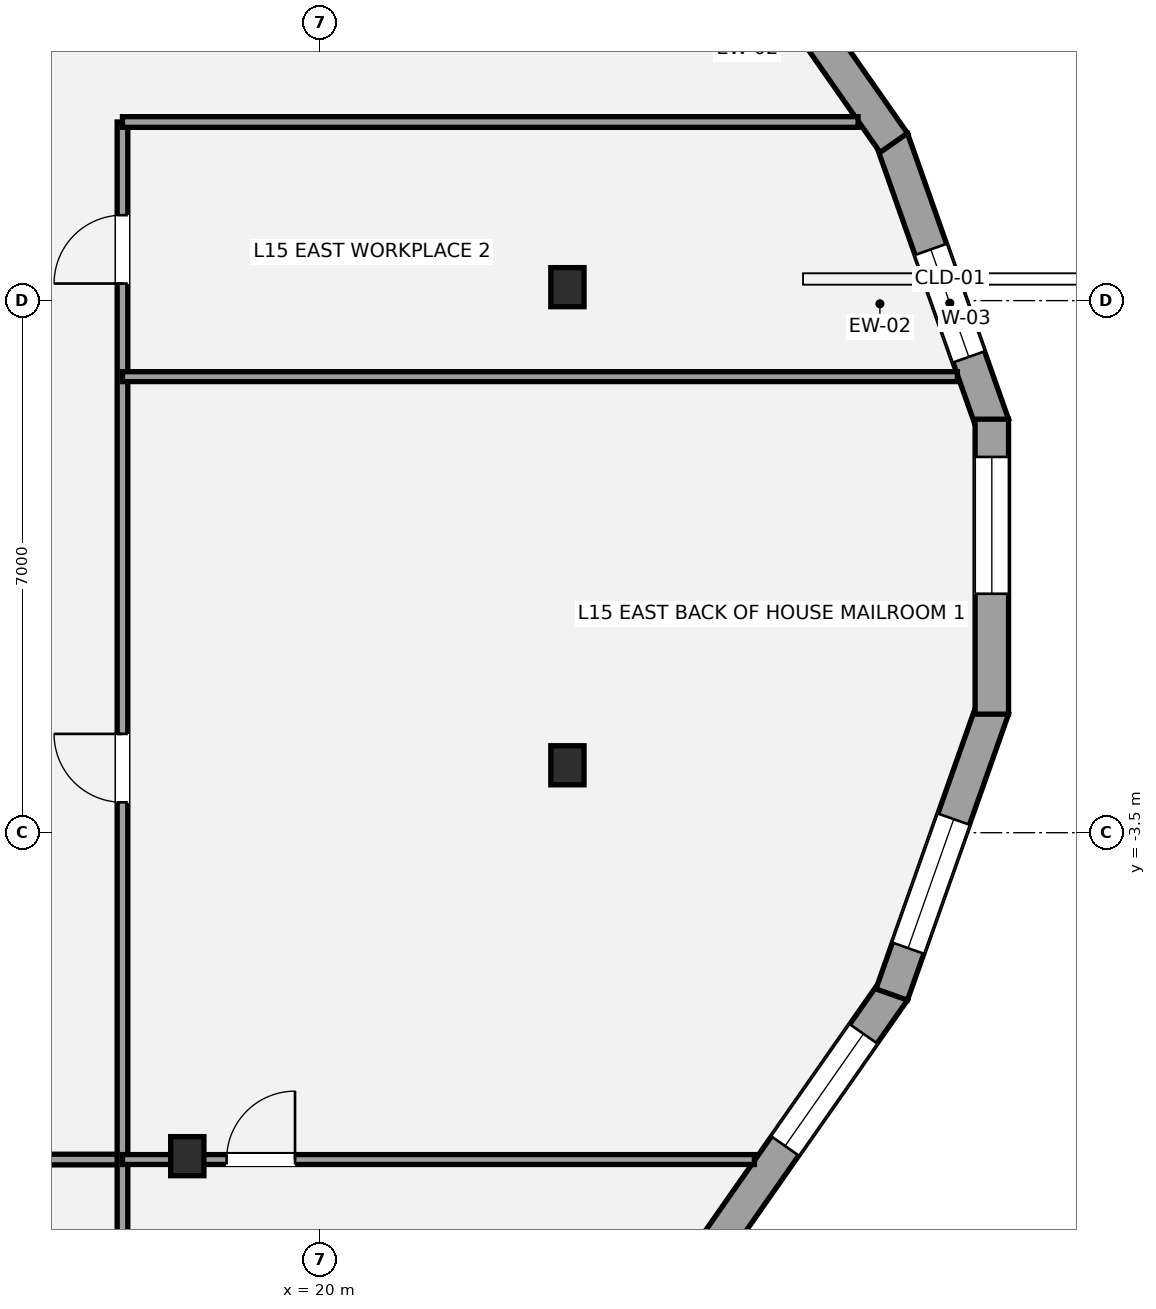
"""IFC4 building model, lengths in metres.
Left out: names, types, materials, properties, quantities, classifications, styles, units other than length and angle.
Written with IfcOpenShell. Run it as: python <this file> out.ifc"""

import sys

from ifc_helpers import new_model, si_unit, direction, frame, frame_2d, origin, origin_2d, place, context, subcontext, project, spatial, rectangle, i_section, extrude, element, fill, save


model = new_model("IFC4")
c1 = context("Model", 3, precision=1e-05, world=origin(), true_north=direction((0.0, 1.0)))
c2 = subcontext(c1, "Body", "Model", "MODEL_VIEW")
j1 = project(units=[si_unit("LENGTHUNIT", "METRE"), si_unit("PLANEANGLEUNIT", "RADIAN")], contexts=[c1])
p1 = place(None, origin())
s1 = spatial("IfcSite", under=j1, at=p1, CompositionType="ELEMENT")
p2 = place(p1, origin())
s2 = spatial("IfcBuilding", under=s1, at=p2, CompositionType="ELEMENT")
p3 = place(p2, frame((0.0, 0.0, 59.4)))
s3 = spatial("IfcBuildingStorey", under=s2, at=p3, CompositionType="ELEMENT", Elevation=59.4)
for number, where, z_axis, x_axis in (
    (1, (23.254, 3.677, 0.0), (0.0, 0.0, 1.0), (1.0, 0.0, 0.0)),
    (2, (18.253, -7.756, 0.0), (0.0, 0.0, 1.0), (1.0, 0.0, 0.0)),
    (3, (23.254, -2.613, 0.0), (0.0, 0.0, 1.0), (1.0, 0.0, 0.0)),
):
    element("IfcColumn", number, at=place(p3, frame(where, z_axis=z_axis, x_axis=x_axis)), inside=s3, PredefinedType="COLUMN", context=c2, shape_type="SweptSolid", body=[
        extrude(i_section(OverallWidth=0.437, OverallDepth=0.514, WebThickness=0.061, FlangeThickness=0.097, at=origin_2d()), origin(), (0.0, 0.0, 1.0), 3.6),
    ])
p4 = place(p3, frame((27.521, 5.629, 0.0), z_axis=(0.0, 0.0, 1.0), x_axis=(0.333264929682, -0.942833223133, 0.0)))
e4 = element("IfcWall", 4, at=p4, inside=s3, PredefinedType="STANDARD", context=c2, shape_type="SweptSolid", body=[
    extrude(rectangle(XDim=3.99, YDim=0.44, at=frame_2d((1.995, 0.0))), origin(), (0.0, 0.0, 1.0), 2.533),
])
p5 = place(p4, frame((1.544, 0.0, 0.48)))
e5 = element("IfcOpeningElement", 5, at=p5, cuts=e4, PredefinedType="OPENING", context=c2, shape_type="SweptSolid", body=[
    extrude(rectangle(XDim=1.5, YDim=1.7, at=frame_2d((0.75, 0.85))), frame((0.0, 0.23, 0.0), z_axis=(0.0, -1.0, 0.0), x_axis=(1.0, 0.0, 0.0)), (0.0, 0.0, 1.0), 0.46),
])
p6 = place(p3, frame((25.123, 9.043, 0.0), z_axis=(0.0, 0.0, 1.0), x_axis=(0.573152463572, -0.819448749771, 0.0)))
e6 = element("IfcWall", 6, at=p6, inside=s3, PredefinedType="STANDARD", context=c2, shape_type="SweptSolid", body=[
    extrude(rectangle(XDim=4.231, YDim=0.44, at=frame_2d((2.115, 0.0))), origin(), (0.0, 0.0, 1.0), 2.529),
])
p7 = place(p6, frame((0.2, 0.0, 0.58)))
e7 = element("IfcOpeningElement", 7, at=p7, cuts=e6, PredefinedType="OPENING", context=c2, shape_type="SweptSolid", body=[
    extrude(rectangle(XDim=1.4, YDim=1.55, at=frame_2d((0.7, 0.775))), frame((0.0, 0.23, 0.0), z_axis=(0.0, -1.0, 0.0), x_axis=(1.0, 0.0, 0.0)), (0.0, 0.0, 1.0), 0.46),
])
p8 = place(p3, frame((27.548, -5.576, 0.0), z_axis=(0.0, 0.0, 1.0), x_axis=(-0.573152463572, -0.819448749771, 0.0)))
e8 = element("IfcWall", 8, at=p8, inside=s3, PredefinedType="STANDARD", context=c2, shape_type="SweptSolid", body=[
    extrude(rectangle(XDim=4.231, YDim=0.44, at=frame_2d((2.115, 0.0))), origin(), (0.0, 0.0, 1.0), 2.529),
])
p9 = place(p8, frame((0.695, 0.0, 0.65)))
e9 = element("IfcOpeningElement", 9, at=p9, cuts=e8, PredefinedType="OPENING", context=c2, shape_type="SweptSolid", body=[
    extrude(rectangle(XDim=1.8, YDim=1.7, at=frame_2d((0.9, 0.85))), frame((0.0, 0.23, 0.0), z_axis=(0.0, -1.0, 0.0), x_axis=(1.0, 0.0, 0.0)), (0.0, 0.0, 1.0), 0.46),
])
p10 = place(p3, frame((28.851, -1.867, 0.0), z_axis=(0.0, 0.0, 1.0), x_axis=(-0.333264929682, -0.942833223133, 0.0)))
e10 = element("IfcWall", 10, at=p10, inside=s3, PredefinedType="STANDARD", context=c2, shape_type="SweptSolid", body=[
    extrude(rectangle(XDim=3.99, YDim=0.44, at=frame_2d((1.995, 0.0))), origin(), (0.0, 0.0, 1.0), 2.533),
])
p11 = place(p10, frame((1.543, 0.0, 0.65)))
e11 = element("IfcOpeningElement", 11, at=p11, cuts=e10, PredefinedType="OPENING", context=c2, shape_type="SweptSolid", body=[
    extrude(rectangle(XDim=1.8, YDim=1.7, at=frame_2d((0.9, 0.85))), frame((0.0, 0.23, 0.0), z_axis=(0.0, -1.0, 0.0), x_axis=(1.0, 0.0, 0.0)), (0.0, 0.0, 1.0), 0.46),
])
p12 = place(p3, frame((28.838, 1.94, 0.0), z_axis=(0.0, 0.0, 1.0), x_axis=(0.0, -1.0, 0.0)))
e12 = element("IfcWall", 12, at=p12, inside=s3, PredefinedType="STANDARD", context=c2, shape_type="SweptSolid", body=[
    extrude(rectangle(XDim=3.88, YDim=0.44, at=frame_2d((1.94, 0.0))), origin(), (0.0, 0.0, 1.0), 2.533),
])
p13 = place(p12, frame((0.497, 0.0, 0.65)))
e13 = element("IfcOpeningElement", 13, at=p13, cuts=e12, PredefinedType="OPENING", context=c2, shape_type="SweptSolid", body=[
    extrude(rectangle(XDim=1.8, YDim=1.7, at=frame_2d((0.9, 0.85))), frame((0.0, 0.23, 0.0), z_axis=(0.0, -1.0, 0.0), x_axis=(1.0, 0.0, 0.0)), (0.0, 0.0, 1.0), 0.46),
])
p14 = place(p3, frame((-17.4, -7.8, 0.0), z_axis=(0.0, 0.0, 1.0), x_axis=(1.0, 0.0, 0.0)))
e14 = element("IfcWall", 14, at=p14, inside=s3, PredefinedType="PARTITIONING", context=c2, shape_type="SweptSolid", body=[
    extrude(rectangle(XDim=34.8, YDim=0.14, at=frame_2d((17.4, 0.0))), origin(), (0.0, 0.0, 1.0), 2.779),
])
p15 = place(p14, frame((3.5, 0.0, 0.0)))
e15 = element("IfcOpeningElement", 15, at=p15, cuts=e14, PredefinedType="OPENING", context=c2, shape_type="SweptSolid", body=[
    extrude(rectangle(XDim=0.9, YDim=2.1, at=frame_2d((0.45, 1.05))), frame((0.0, 0.08, 0.0), z_axis=(0.0, -1.0, 0.0), x_axis=(1.0, 0.0, 0.0)), (0.0, 0.0, 1.0), 0.16),
])
p16 = place(p14, frame((10.95, 0.0, 0.0)))
e16 = element("IfcOpeningElement", 16, at=p16, cuts=e14, PredefinedType="OPENING", context=c2, shape_type="SweptSolid", body=[
    extrude(rectangle(XDim=0.9, YDim=2.1, at=frame_2d((0.45, 1.05))), frame((0.0, 0.08, 0.0), z_axis=(0.0, -1.0, 0.0), x_axis=(1.0, 0.0, 0.0)), (0.0, 0.0, 1.0), 0.16),
])
p17 = place(p14, frame((17.95, 0.0, 0.0)))
e17 = element("IfcOpeningElement", 17, at=p17, cuts=e14, PredefinedType="OPENING", context=c2, shape_type="SweptSolid", body=[
    extrude(rectangle(XDim=0.9, YDim=2.1, at=frame_2d((0.45, 1.05))), frame((0.0, 0.08, 0.0), z_axis=(0.0, -1.0, 0.0), x_axis=(1.0, 0.0, 0.0)), (0.0, 0.0, 1.0), 0.16),
])
p18 = place(p14, frame((24.45, 0.0, 0.0)))
e18 = element("IfcOpeningElement", 18, at=p18, cuts=e14, PredefinedType="OPENING", context=c2, shape_type="SweptSolid", body=[
    extrude(rectangle(XDim=0.9, YDim=2.1, at=frame_2d((0.45, 1.05))), frame((0.0, 0.08, 0.0), z_axis=(0.0, -1.0, 0.0), x_axis=(1.0, 0.0, 0.0)), (0.0, 0.0, 1.0), 0.16),
])
p19 = place(p14, frame((30.9, 0.0, 0.0)))
e19 = element("IfcOpeningElement", 19, at=p19, cuts=e14, PredefinedType="OPENING", context=c2, shape_type="SweptSolid", body=[
    extrude(rectangle(XDim=0.9, YDim=2.1, at=frame_2d((0.45, 1.05))), frame((0.0, 0.08, 0.0), z_axis=(0.0, -1.0, 0.0), x_axis=(1.0, 0.0, 0.0)), (0.0, 0.0, 1.0), 0.16),
])
p20 = place(p3, frame((17.4, -14.745, 0.0), z_axis=(0.0, 0.0, 1.0), x_axis=(0.0, 1.0, 0.0)))
e20 = element("IfcWall", 20, at=p20, inside=s3, PredefinedType="PARTITIONING", context=c2, shape_type="SweptSolid", body=[
    extrude(rectangle(XDim=20.595, YDim=0.14, at=frame_2d((10.298, 0.0))), origin(), (0.0, 0.0, 1.0), 2.841),
])
p21 = place(p20, frame((11.645, 0.0, 0.0)))
e21 = element("IfcOpeningElement", 21, at=p21, cuts=e20, PredefinedType="OPENING", context=c2, shape_type="SweptSolid", body=[
    extrude(rectangle(XDim=0.9, YDim=2.1, at=frame_2d((0.45, 1.05))), frame((0.0, 0.08, 0.0), z_axis=(0.0, -1.0, 0.0), x_axis=(1.0, 0.0, 0.0)), (0.0, 0.0, 1.0), 0.16),
])
p22 = place(p20, frame((18.47, 0.0, 0.0)))
e22 = element("IfcOpeningElement", 22, at=p22, cuts=e20, PredefinedType="OPENING", context=c2, shape_type="SweptSolid", body=[
    extrude(rectangle(XDim=0.9, YDim=2.1, at=frame_2d((0.45, 1.05))), frame((0.0, 0.08, 0.0), z_axis=(0.0, -1.0, 0.0), x_axis=(1.0, 0.0, 0.0)), (0.0, 0.0, 1.0), 0.16),
])
p23 = place(p3, frame((17.4, 5.85, 0.0), z_axis=(0.0, 0.0, 1.0), x_axis=(1.0, 0.0, 0.0)))
e23 = element("IfcWall", 23, at=p23, inside=s3, PredefinedType="PARTITIONING", context=c2, shape_type="SweptSolid", body=[
    extrude(rectangle(XDim=9.678, YDim=0.14, at=frame_2d((4.839, 0.0))), origin(), (0.0, 0.0, 1.0), 2.853),
])
p24 = place(p3, frame((17.4, -7.8, 0.0), z_axis=(0.0, 0.0, 1.0), x_axis=(1.0, 0.0, 0.0)))
e24 = element("IfcWall", 24, at=p24, inside=s3, PredefinedType="PARTITIONING", context=c2, shape_type="SweptSolid", body=[
    extrude(rectangle(XDim=8.314, YDim=0.13, at=frame_2d((4.157, 0.0))), origin(), (0.0, 0.0, 1.0), 2.779),
])
p25 = place(p24, frame((1.37, 0.0, 0.0)))
e25 = element("IfcOpeningElement", 25, at=p25, cuts=e24, PredefinedType="OPENING", context=c2, shape_type="SweptSolid", body=[
    extrude(rectangle(XDim=0.9, YDim=2.1, at=frame_2d((0.45, 1.05))), frame((0.0, 0.075, 0.0), z_axis=(0.0, -1.0, 0.0), x_axis=(1.0, 0.0, 0.0)), (0.0, 0.0, 1.0), 0.15),
])
p26 = place(p3, frame((17.4, 2.5, 0.0), z_axis=(0.0, 0.0, 1.0), x_axis=(1.0, 0.0, 0.0)))
e26 = element("IfcWall", 26, at=p26, inside=s3, PredefinedType="PARTITIONING", context=c2, shape_type="SweptSolid", body=[
    extrude(rectangle(XDim=10.985, YDim=0.13, at=frame_2d((5.493, 0.0))), origin(), (0.0, 0.0, 1.0), 2.841),
])
p27 = place(p5, origin())
e27 = element("IfcWindow", 27, at=p27, inside=s3, PartitioningType="SINGLE_PANEL", PredefinedType="WINDOW", context=c2, shape_type="SweptSolid", body=[
    extrude(rectangle(XDim=1.5, YDim=1.7, at=frame_2d((0.75, 0.85))), frame((0.0, -0.01, 0.0), z_axis=(0.0, -1.0, 0.0), x_axis=(1.0, 0.0, 0.0)), (0.0, 0.0, 1.0), 0.06),
])
fill(e5, e27)
p28 = place(p9, origin())
e28 = element("IfcWindow", 28, at=p28, inside=s3, PartitioningType="SINGLE_PANEL", PredefinedType="WINDOW", context=c2, shape_type="SweptSolid", body=[
    extrude(rectangle(XDim=1.8, YDim=1.7, at=frame_2d((0.9, 0.85))), frame((0.0, -0.01, 0.0), z_axis=(0.0, -1.0, 0.0), x_axis=(1.0, 0.0, 0.0)), (0.0, 0.0, 1.0), 0.06),
])
fill(e9, e28)
p29 = place(p11, origin())
e29 = element("IfcWindow", 29, at=p29, inside=s3, PartitioningType="SINGLE_PANEL", PredefinedType="WINDOW", context=c2, shape_type="SweptSolid", body=[
    extrude(rectangle(XDim=1.8, YDim=1.7, at=frame_2d((0.9, 0.85))), frame((0.0, -0.01, 0.0), z_axis=(0.0, -1.0, 0.0), x_axis=(1.0, 0.0, 0.0)), (0.0, 0.0, 1.0), 0.06),
])
fill(e11, e29)
p30 = place(p13, origin())
e30 = element("IfcWindow", 30, at=p30, inside=s3, PartitioningType="SINGLE_PANEL", PredefinedType="WINDOW", context=c2, shape_type="SweptSolid", body=[
    extrude(rectangle(XDim=1.8, YDim=1.7, at=frame_2d((0.9, 0.85))), frame((0.0, -0.01, 0.0), z_axis=(0.0, -1.0, 0.0), x_axis=(1.0, 0.0, 0.0)), (0.0, 0.0, 1.0), 0.06),
])
fill(e13, e30)
p31 = place(p25, origin())
e31 = element("IfcDoor", 31, at=p31, inside=s3, OperationType="SINGLE_SWING_RIGHT", PredefinedType="DOOR", context=c2, shape_type="SweptSolid", body=[
    extrude(rectangle(XDim=0.9, YDim=2.1, at=frame_2d((0.45, 1.05))), frame((0.0, 0.025, 0.0), z_axis=(0.0, -1.0, 0.0), x_axis=(1.0, 0.0, 0.0)), (0.0, 0.0, 1.0), 0.05),
])
fill(e25, e31)
p32 = place(p21, origin())
e32 = element("IfcDoor", 32, at=p32, inside=s3, OperationType="SINGLE_SWING_RIGHT", PredefinedType="DOOR", context=c2, shape_type="SweptSolid", body=[
    extrude(rectangle(XDim=0.9, YDim=2.1, at=frame_2d((0.45, 1.05))), frame((0.0, 0.025, 0.0), z_axis=(0.0, -1.0, 0.0), x_axis=(1.0, 0.0, 0.0)), (0.0, 0.0, 1.0), 0.05),
])
fill(e21, e32)
p33 = place(p22, origin())
e33 = element("IfcDoor", 33, at=p33, inside=s3, OperationType="SINGLE_SWING_LEFT", PredefinedType="DOOR", context=c2, shape_type="SweptSolid", body=[
    extrude(rectangle(XDim=0.9, YDim=2.1, at=frame_2d((0.45, 1.05))), frame((0.0, 0.025, 0.0), z_axis=(0.0, -1.0, 0.0), x_axis=(1.0, 0.0, 0.0)), (0.0, 0.0, 1.0), 0.05),
])
fill(e22, e33)
save(model, sys.argv[1])
